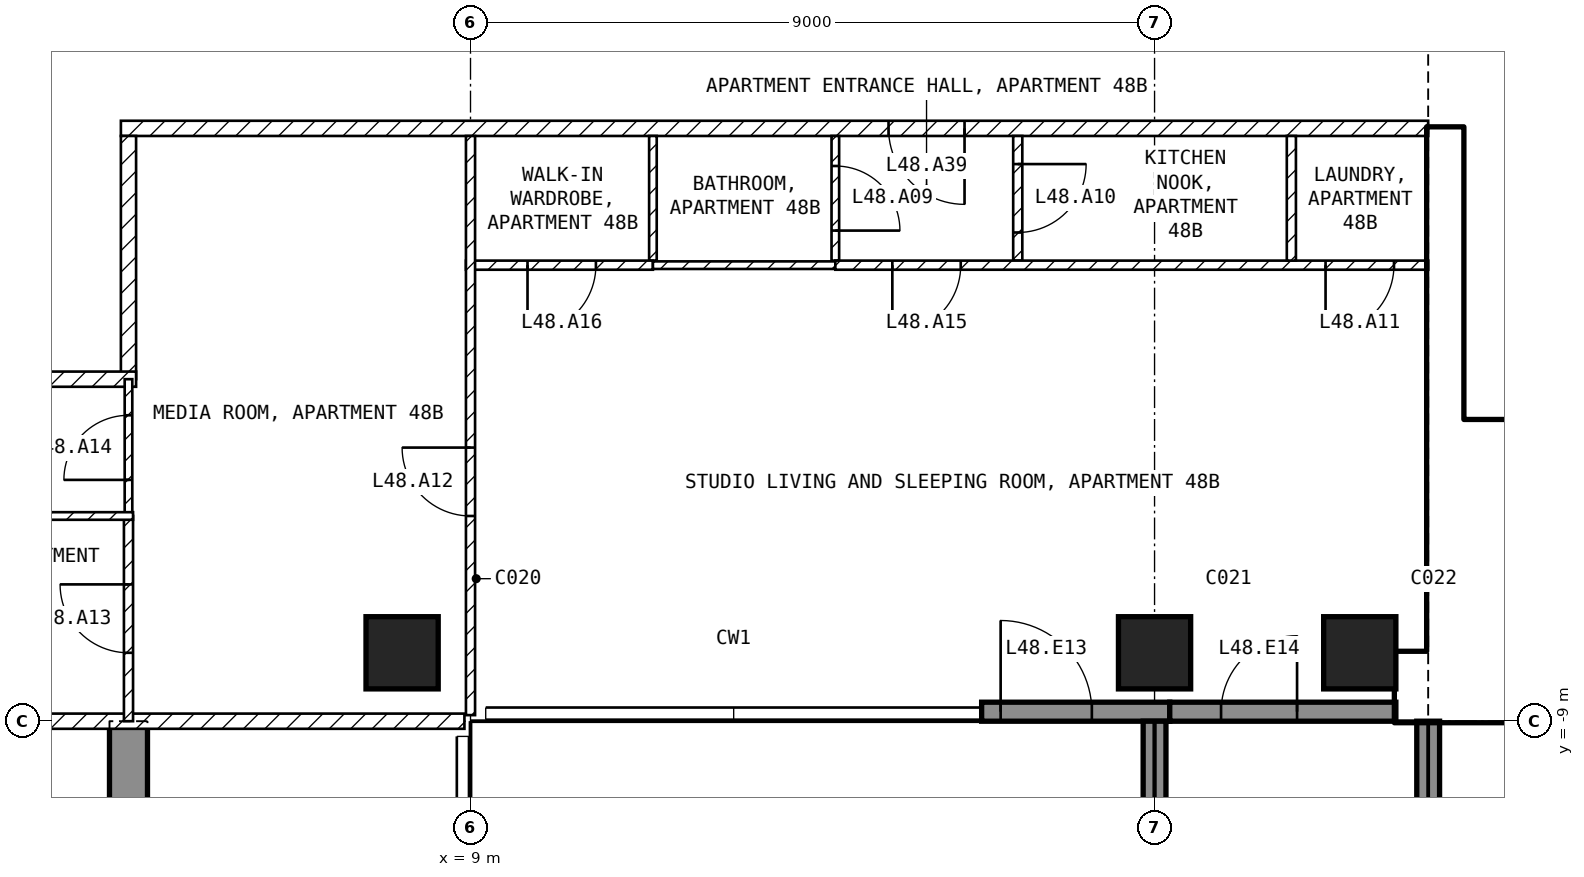
"""IFC4 building model, lengths in metres.
Left out: names, types, materials, properties, quantities, classifications, styles, units other than length and angle.
Written with IfcOpenShell. Run it as: python <this file> out.ifc"""

import sys

from ifc_helpers import new_model, si_unit, direction, frame, frame_2d, origin, origin_2d, place, context, subcontext, project, spatial, polyline, rectangle, outline, extrude, element, fill, save


model = new_model("IFC4")
c1 = context("Model", 3, precision=1e-05, world=origin(), true_north=direction((0.0, 1.0)))
c2 = subcontext(c1, "Body", "Model", "MODEL_VIEW")
j1 = project(units=[si_unit("LENGTHUNIT", "METRE"), si_unit("PLANEANGLEUNIT", "RADIAN")], contexts=[c1])
p1 = place(None, origin())
s1 = spatial("IfcSite", under=j1, at=p1, CompositionType="ELEMENT")
p2 = place(p1, origin())
s2 = spatial("IfcBuilding", under=s1, at=p2, CompositionType="ELEMENT")
p3 = place(p2, frame((0.0, 0.0, 194.6)))
s3 = spatial("IfcBuildingStorey", under=s2, at=p3, CompositionType="ELEMENT", Elevation=194.6)
for number, where, z_axis, x_axis in (
    (1, (8.1, -8.1, -0.25), (0.0, 0.0, 1.0), (1.0, 0.0, 0.0)),
    (2, (18.0, -8.1, -0.25), (0.0, 0.0, 1.0), (1.0, 0.0, 0.0)),
    (3, (20.7, -8.1, -0.25), (0.0, 0.0, 1.0), (1.0, 0.0, 0.0)),
):
    element("IfcColumn", number, at=place(p3, frame(where, z_axis=z_axis, x_axis=x_axis)), inside=s3, PredefinedType="COLUMN", context=c2, shape_type="SweptSolid", body=[
        extrude(rectangle(XDim=0.95, YDim=0.95, at=origin_2d()), origin(), (0.0, 0.0, 1.0), 3.5),
    ])
p4 = place(p3, frame((4.25, -20.225, -0.25), z_axis=(1.0, 0.0, 0.0), x_axis=(0.0, 1.0, 0.0)))
e4 = element("IfcWall", 4, at=p4, inside=s3, PredefinedType="SHEAR", context=c2, shape_type="SweptSolid", body=[
    extrude(outline(polyline([(0.0, 0.0), (6.725, 0.0), (6.725, 2.65), (9.125, 2.65), (9.125, 0.0), (11.225, 0.0), (11.225, 3.5), (0.0, 3.5), (0.0, 0.0)])), origin(), (0.0, 0.0, 1.0), 0.5),
])
p5 = place(p3, frame((15.725, -8.875, 0.0), z_axis=(0.0, 0.0, 1.0), x_axis=(1.0, 0.0, 0.0)))
e5 = element("IfcWall", 5, at=p5, inside=s3, PredefinedType="SOLIDWALL", context=c2, shape_type="SweptSolid", body=[
    extrude(rectangle(XDim=2.475, YDim=0.25, at=frame_2d((1.237, 0.0))), origin(), (0.0, 0.0, 1.0), 3.25),
])
p6 = place(p5, frame((0.25, 0.0, 0.0)))
e6 = element("IfcOpeningElement", 6, at=p6, cuts=e5, PredefinedType="OPENING", context=c2, shape_type="SweptSolid", body=[
    extrude(rectangle(XDim=1.2, YDim=2.4, at=frame_2d((0.6, 1.2))), frame((0.0, 0.135, 0.0), z_axis=(0.0, -1.0, 0.0), x_axis=(1.0, 0.0, 0.0)), (0.0, 0.0, 1.0), 0.27),
])
p7 = place(p3, frame((18.2, -8.875, 0.0), z_axis=(0.0, 0.0, 1.0), x_axis=(1.0, 0.0, 0.0)))
e7 = element("IfcWall", 7, at=p7, inside=s3, PredefinedType="SOLIDWALL", context=c2, shape_type="SweptSolid", body=[
    extrude(rectangle(XDim=2.975, YDim=0.25, at=frame_2d((1.488, 0.0))), origin(), (0.0, 0.0, 1.0), 3.25),
])
p8 = place(p7, frame((0.675, 0.0, 0.0)))
e8 = element("IfcOpeningElement", 8, at=p8, cuts=e7, PredefinedType="OPENING", context=c2, shape_type="SweptSolid", body=[
    extrude(rectangle(XDim=1.0, YDim=2.4, at=frame_2d((0.5, 1.2))), frame((0.0, 0.135, 0.0), z_axis=(0.0, -1.0, 0.0), x_axis=(1.0, 0.0, 0.0)), (0.0, 0.0, 1.0), 0.27),
])
for number, where, z_axis, x_axis in (
    (9, (18.0, -9.0, 0.0), (0.0, 0.0, 1.0), (0.0, -1.0, 0.0)),
    (10, (21.6, -9.0, 0.0), (0.0, 0.0, 1.0), (0.0, -1.0, 0.0)),
):
    element("IfcWall", number, at=place(p3, frame(where, z_axis=z_axis, x_axis=x_axis)), inside=s3, PredefinedType="SOLIDWALL", context=c2, shape_type="SweptSolid", body=[
        extrude(rectangle(XDim=2.7, YDim=0.3, at=frame_2d((1.35, 0.0))), origin(), (0.0, 0.0, 1.0), 3.25),
    ])
p9 = place(p3, frame((21.175, -8.55, 0.0), z_axis=(0.0, 0.0, 1.0), x_axis=(1.0, 0.0, 0.0)))
e11 = element("IfcWall", 11, at=p9, inside=s3, PredefinedType="SHEAR", context=c2, shape_type="SweptSolid", body=[
    extrude(rectangle(XDim=9.025, YDim=0.9, at=frame_2d((4.512, 0.0))), origin(), (0.0, 0.0, 1.0), 3.25),
])
p10 = place(p3, frame((21.825, -8.1, 0.0), z_axis=(0.0, 0.0, 1.0), x_axis=(0.0, 1.0, 0.0)))
e12 = element("IfcWall", 12, at=p10, inside=s3, PredefinedType="SHEAR", context=c2, shape_type="SweptSolid", body=[
    extrude(rectangle(XDim=6.9, YDim=0.45, at=frame_2d((3.45, 0.0))), origin(), (0.0, 0.0, 1.0), 3.25),
])
p11 = place(p3, frame((22.05, -5.15, 0.0), z_axis=(0.0, 0.0, 1.0), x_axis=(1.0, 0.0, 0.0)))
e13 = element("IfcWall", 13, at=p11, inside=s3, PredefinedType="SOLIDWALL", context=c2, shape_type="SweptSolid", body=[
    extrude(rectangle(XDim=6.3, YDim=0.2, at=frame_2d((3.15, 0.0))), origin(), (0.0, 0.0, 1.0), 3.25),
])
p12 = place(p11, frame((0.2, 0.0, 0.0)))
e14 = element("IfcOpeningElement", 14, at=p12, cuts=e13, PredefinedType="OPENING", context=c2, shape_type="SweptSolid", body=[
    extrude(rectangle(XDim=1.0, YDim=2.1, at=frame_2d((0.5, 1.05))), frame((0.0, 0.11, 0.0), z_axis=(0.0, -1.0, 0.0), x_axis=(1.0, 0.0, 0.0)), (0.0, 0.0, 1.0), 0.22),
])
p13 = place(p3, frame((21.6, -1.2, 0.0), z_axis=(0.0, 0.0, 1.0), x_axis=(-1.0, 0.0, 0.0)))
e15 = element("IfcWall", 15, at=p13, inside=s3, PredefinedType="PARTITIONING", context=c2, shape_type="SweptSolid", body=[
    extrude(rectangle(XDim=17.2, YDim=0.2, at=frame_2d((8.6, 0.0))), origin(), (0.0, 0.0, 1.0), 3.25),
])
p14 = place(p13, frame((6.1, 0.0, 0.0)))
e16 = element("IfcOpeningElement", 16, at=p14, cuts=e15, PredefinedType="OPENING", context=c2, shape_type="SweptSolid", body=[
    extrude(rectangle(XDim=1.0, YDim=2.1, at=frame_2d((0.5, 1.05))), frame((0.0, 0.11, 0.0), z_axis=(0.0, -1.0, 0.0), x_axis=(1.0, 0.0, 0.0)), (0.0, 0.0, 1.0), 0.22),
])
p15 = place(p3, frame((4.5, -1.3, 0.0), z_axis=(0.0, 0.0, 1.0), x_axis=(0.0, -1.0, 0.0)))
e17 = element("IfcWall", 17, at=p15, inside=s3, PredefinedType="PARTITIONING", context=c2, shape_type="SweptSolid", body=[
    extrude(rectangle(XDim=3.2, YDim=0.2, at=frame_2d((1.6, 0.0))), origin(), (0.0, 0.0, 1.0), 3.25),
])
p16 = place(p3, frame((4.6, -4.5, 0.0), z_axis=(0.0, 0.0, 1.0), x_axis=(-1.0, 0.0, 0.0)))
e18 = element("IfcWall", 18, at=p16, inside=s3, PredefinedType="PARTITIONING", context=c2, shape_type="SweptSolid", body=[
    extrude(rectangle(XDim=3.5, YDim=0.2, at=frame_2d((1.75, 0.0))), origin(), (0.0, 0.0, 1.0), 3.25),
])
p17 = place(p3, frame((8.92, -9.0, 0.0), z_axis=(0.0, 0.0, 1.0), x_axis=(-1.0, 0.0, 0.0)))
e19 = element("IfcWall", 19, at=p17, inside=s3, PredefinedType="PARTITIONING", context=c2, shape_type="SweptSolid", body=[
    extrude(rectangle(XDim=17.84, YDim=0.2, at=frame_2d((8.92, 0.0))), origin(), (0.0, 0.0, 1.0), 3.25),
])
p18 = place(p17, frame((8.42, 0.0, 0.0)))
e20 = element("IfcOpeningElement", 20, at=p18, cuts=e19, PredefinedType="OPENING", context=c2, shape_type="SweptSolid", body=[
    extrude(rectangle(XDim=1.0, YDim=2.1, at=frame_2d((0.5, 1.05))), frame((0.0, 0.11, 0.0), z_axis=(0.0, -1.0, 0.0), x_axis=(1.0, 0.0, 0.0)), (0.0, 0.0, 1.0), 0.22),
])
p19 = place(p3, frame((11.4, -1.3, 0.0), z_axis=(0.0, 0.0, 1.0), x_axis=(0.0, -1.0, 0.0)))
e21 = element("IfcWall", 21, at=p19, inside=s3, PredefinedType="PARTITIONING", context=c2, shape_type="SweptSolid", body=[
    extrude(rectangle(XDim=1.64, YDim=0.1, at=frame_2d((0.82, 0.0))), origin(), (0.0, 0.0, 1.0), 3.25),
])
p20 = place(p3, frame((11.4, -3.0, 0.0), z_axis=(0.0, 0.0, 1.0), x_axis=(-1.0, 0.0, 0.0)))
e22 = element("IfcWall", 22, at=p20, inside=s3, PredefinedType="PARTITIONING", context=c2, shape_type="SweptSolid", body=[
    extrude(rectangle(XDim=2.46, YDim=0.12, at=frame_2d((1.23, 0.0))), origin(), (0.0, 0.0, 1.0), 3.25),
])
p21 = place(p20, frame((0.75, 0.0, 0.0)))
e23 = element("IfcOpeningElement", 23, at=p21, cuts=e22, PredefinedType="OPENING", context=c2, shape_type="SweptSolid", body=[
    extrude(rectangle(XDim=0.9, YDim=2.1, at=frame_2d((0.45, 1.05))), frame((0.0, 0.07, 0.0), z_axis=(0.0, -1.0, 0.0), x_axis=(1.0, 0.0, 0.0)), (0.0, 0.0, 1.0), 0.14),
])
p22 = place(p3, frame((9.0, -8.92, 0.0), z_axis=(0.0, 0.0, 1.0), x_axis=(0.0, 1.0, 0.0)))
e24 = element("IfcWall", 24, at=p22, inside=s3, PredefinedType="PARTITIONING", context=c2, shape_type="SweptSolid", body=[
    extrude(rectangle(XDim=7.62, YDim=0.12, at=frame_2d((3.81, 0.0))), origin(), (0.0, 0.0, 1.0), 3.25),
])
p23 = place(p22, frame((2.62, 0.0, 0.0)))
e25 = element("IfcOpeningElement", 25, at=p23, cuts=e24, PredefinedType="OPENING", context=c2, shape_type="SweptSolid", body=[
    extrude(rectangle(XDim=0.9, YDim=2.1, at=frame_2d((0.45, 1.05))), frame((0.0, 0.07, 0.0), z_axis=(0.0, -1.0, 0.0), x_axis=(1.0, 0.0, 0.0)), (0.0, 0.0, 1.0), 0.14),
])
p24 = place(p3, frame((13.8, -1.3, 0.0), z_axis=(0.0, 0.0, 1.0), x_axis=(0.0, -1.0, 0.0)))
e26 = element("IfcWall", 26, at=p24, inside=s3, PredefinedType="PARTITIONING", context=c2, shape_type="SweptSolid", body=[
    extrude(rectangle(XDim=1.64, YDim=0.1, at=frame_2d((0.82, 0.0))), origin(), (0.0, 0.0, 1.0), 3.25),
])
p25 = place(p24, frame((0.395, 0.0, 0.0)))
e27 = element("IfcOpeningElement", 27, at=p25, cuts=e26, PredefinedType="OPENING", context=c2, shape_type="SweptSolid", body=[
    extrude(rectangle(XDim=0.85, YDim=2.1, at=frame_2d((0.425, 1.05))), frame((0.0, 0.06, 0.0), z_axis=(0.0, -1.0, 0.0), x_axis=(1.0, 0.0, 0.0)), (0.0, 0.0, 1.0), 0.12),
])
p26 = place(p3, frame((13.8, -3.0, 0.0), z_axis=(0.0, 0.0, 1.0), x_axis=(-1.0, 0.0, 0.0)))
e28 = element("IfcWall", 28, at=p26, inside=s3, PredefinedType="PARTITIONING", context=c2, shape_type="SweptSolid", body=[
    extrude(rectangle(XDim=2.4, YDim=0.1, at=frame_2d((1.2, 0.0))), origin(), (0.0, 0.0, 1.0), 3.25),
])
p27 = place(p3, frame((16.2, -1.3, 0.0), z_axis=(0.0, 0.0, 1.0), x_axis=(0.0, -1.0, 0.0)))
e29 = element("IfcWall", 29, at=p27, inside=s3, PredefinedType="PARTITIONING", context=c2, shape_type="SweptSolid", body=[
    extrude(rectangle(XDim=1.64, YDim=0.12, at=frame_2d((0.82, 0.0))), origin(), (0.0, 0.0, 1.0), 3.25),
])
p28 = place(p27, frame((0.37, 0.0, 0.0)))
e30 = element("IfcOpeningElement", 30, at=p28, cuts=e29, PredefinedType="OPENING", context=c2, shape_type="SweptSolid", body=[
    extrude(rectangle(XDim=0.9, YDim=2.1, at=frame_2d((0.45, 1.05))), frame((0.0, 0.07, 0.0), z_axis=(0.0, -1.0, 0.0), x_axis=(1.0, 0.0, 0.0)), (0.0, 0.0, 1.0), 0.14),
])
p29 = place(p3, frame((21.6, -3.0, 0.0), z_axis=(0.0, 0.0, 1.0), x_axis=(-1.0, 0.0, 0.0)))
e31 = element("IfcWall", 31, at=p29, inside=s3, PredefinedType="PARTITIONING", context=c2, shape_type="SweptSolid", body=[
    extrude(rectangle(XDim=7.8, YDim=0.12, at=frame_2d((3.9, 0.0))), origin(), (0.0, 0.0, 1.0), 3.25),
])
p30 = place(p29, frame((0.45, 0.0, 0.0)))
e32 = element("IfcOpeningElement", 32, at=p30, cuts=e31, PredefinedType="OPENING", context=c2, shape_type="SweptSolid", body=[
    extrude(rectangle(XDim=0.9, YDim=2.1, at=frame_2d((0.45, 1.05))), frame((0.0, 0.07, 0.0), z_axis=(0.0, -1.0, 0.0), x_axis=(1.0, 0.0, 0.0)), (0.0, 0.0, 1.0), 0.14),
])
p31 = place(p29, frame((6.15, 0.0, 0.0)))
e33 = element("IfcOpeningElement", 33, at=p31, cuts=e31, PredefinedType="OPENING", context=c2, shape_type="SweptSolid", body=[
    extrude(rectangle(XDim=0.9, YDim=2.1, at=frame_2d((0.45, 1.05))), frame((0.0, 0.07, 0.0), z_axis=(0.0, -1.0, 0.0), x_axis=(1.0, 0.0, 0.0)), (0.0, 0.0, 1.0), 0.14),
])
p32 = place(p3, frame((19.8, -1.3, 0.0), z_axis=(0.0, 0.0, 1.0), x_axis=(0.0, -1.0, 0.0)))
e34 = element("IfcWall", 34, at=p32, inside=s3, PredefinedType="PARTITIONING", context=c2, shape_type="SweptSolid", body=[
    extrude(rectangle(XDim=1.64, YDim=0.12, at=frame_2d((0.82, 0.0))), origin(), (0.0, 0.0, 1.0), 3.25),
])
p33 = place(p3, frame((4.5, -6.3, 0.0), z_axis=(0.0, 0.0, 1.0), x_axis=(0.0, 1.0, 0.0)))
e35 = element("IfcWall", 35, at=p33, inside=s3, PredefinedType="PARTITIONING", context=c2, shape_type="SweptSolid", body=[
    extrude(rectangle(XDim=1.8, YDim=0.1, at=frame_2d((0.9, 0.0))), origin(), (0.0, 0.0, 1.0), 3.25),
])
p34 = place(p33, frame((0.475, 0.0, 0.0)))
e36 = element("IfcOpeningElement", 36, at=p34, cuts=e35, PredefinedType="OPENING", context=c2, shape_type="SweptSolid", body=[
    extrude(rectangle(XDim=0.85, YDim=2.1, at=frame_2d((0.425, 1.05))), frame((0.0, 0.06, 0.0), z_axis=(0.0, -1.0, 0.0), x_axis=(1.0, 0.0, 0.0)), (0.0, 0.0, 1.0), 0.12),
])
p35 = place(p3, frame((4.5, -9.0, 0.0), z_axis=(0.0, 0.0, 1.0), x_axis=(0.0, 1.0, 0.0)))
e37 = element("IfcWall", 37, at=p35, inside=s3, PredefinedType="PARTITIONING", context=c2, shape_type="SweptSolid", body=[
    extrude(rectangle(XDim=2.7, YDim=0.12, at=frame_2d((1.35, 0.0))), origin(), (0.0, 0.0, 1.0), 3.25),
])
p36 = place(p35, frame((0.9, 0.0, 0.0)))
e38 = element("IfcOpeningElement", 38, at=p36, cuts=e37, PredefinedType="OPENING", context=c2, shape_type="SweptSolid", body=[
    extrude(rectangle(XDim=0.9, YDim=2.1, at=frame_2d((0.45, 1.05))), frame((0.0, 0.07, 0.0), z_axis=(0.0, -1.0, 0.0), x_axis=(1.0, 0.0, 0.0)), (0.0, 0.0, 1.0), 0.14),
])
p37 = place(p3, frame((4.56, -6.3, 0.0), z_axis=(0.0, 0.0, 1.0), x_axis=(-1.0, 0.0, 0.0)))
e39 = element("IfcWall", 39, at=p37, inside=s3, PredefinedType="PARTITIONING", context=c2, shape_type="SweptSolid", body=[
    extrude(rectangle(XDim=3.46, YDim=0.1, at=frame_2d((1.73, 0.0))), origin(), (0.0, 0.0, 1.0), 3.25),
])
p38 = place(p6, origin())
e40 = element("IfcDoor", 40, at=p38, inside=s3, OperationType="SINGLE_SWING_LEFT", PredefinedType="DOOR", context=c2, shape_type="SweptSolid", body=[
    extrude(rectangle(XDim=1.2, YDim=2.4, at=frame_2d((0.6, 1.2))), frame((0.0, 0.025, 0.0), z_axis=(0.0, -1.0, 0.0), x_axis=(1.0, 0.0, 0.0)), (0.0, 0.0, 1.0), 0.05),
])
fill(e6, e40)
p39 = place(p8, origin())
e41 = element("IfcDoor", 41, at=p39, inside=s3, OperationType="SINGLE_SWING_RIGHT", PredefinedType="DOOR", context=c2, shape_type="SweptSolid", body=[
    extrude(rectangle(XDim=1.0, YDim=2.4, at=frame_2d((0.5, 1.2))), frame((0.0, 0.025, 0.0), z_axis=(0.0, -1.0, 0.0), x_axis=(1.0, 0.0, 0.0)), (0.0, 0.0, 1.0), 0.05),
])
fill(e8, e41)
p40 = place(p12, origin())
e42 = element("IfcDoor", 42, at=p40, inside=s3, OperationType="SINGLE_SWING_LEFT", PredefinedType="DOOR", context=c2, shape_type="SweptSolid", body=[
    extrude(rectangle(XDim=1.0, YDim=2.1, at=frame_2d((0.5, 1.05))), frame((0.0, 0.025, 0.0), z_axis=(0.0, -1.0, 0.0), x_axis=(1.0, 0.0, 0.0)), (0.0, 0.0, 1.0), 0.05),
])
fill(e14, e42)
p41 = place(p25, origin())
e43 = element("IfcDoor", 43, at=p41, inside=s3, OperationType="SINGLE_SWING_RIGHT", PredefinedType="DOOR", context=c2, shape_type="SweptSolid", body=[
    extrude(rectangle(XDim=0.85, YDim=2.1, at=frame_2d((0.425, 1.05))), frame((0.0, 0.025, 0.0), z_axis=(0.0, -1.0, 0.0), x_axis=(1.0, 0.0, 0.0)), (0.0, 0.0, 1.0), 0.05),
])
fill(e27, e43)
p42 = place(p28, origin())
e44 = element("IfcDoor", 44, at=p42, inside=s3, OperationType="SINGLE_SWING_LEFT", PredefinedType="DOOR", context=c2, shape_type="SweptSolid", body=[
    extrude(rectangle(XDim=0.9, YDim=2.1, at=frame_2d((0.45, 1.05))), frame((0.0, 0.025, 0.0), z_axis=(0.0, -1.0, 0.0), x_axis=(1.0, 0.0, 0.0)), (0.0, 0.0, 1.0), 0.05),
])
fill(e30, e44)
p43 = place(p30, origin())
e45 = element("IfcDoor", 45, at=p43, inside=s3, OperationType="SINGLE_SWING_RIGHT", PredefinedType="DOOR", context=c2, shape_type="SweptSolid", body=[
    extrude(rectangle(XDim=0.9, YDim=2.1, at=frame_2d((0.45, 1.05))), frame((0.0, 0.025, 0.0), z_axis=(0.0, -1.0, 0.0), x_axis=(1.0, 0.0, 0.0)), (0.0, 0.0, 1.0), 0.05),
])
fill(e32, e45)
p44 = place(p23, origin())
e46 = element("IfcDoor", 46, at=p44, inside=s3, OperationType="SINGLE_SWING_RIGHT", PredefinedType="DOOR", context=c2, shape_type="SweptSolid", body=[
    extrude(rectangle(XDim=0.9, YDim=2.1, at=frame_2d((0.45, 1.05))), frame((0.0, 0.025, 0.0), z_axis=(0.0, -1.0, 0.0), x_axis=(1.0, 0.0, 0.0)), (0.0, 0.0, 1.0), 0.05),
])
fill(e25, e46)
p45 = place(p36, origin())
e47 = element("IfcDoor", 47, at=p45, inside=s3, OperationType="SINGLE_SWING_RIGHT", PredefinedType="DOOR", context=c2, shape_type="SweptSolid", body=[
    extrude(rectangle(XDim=0.9, YDim=2.1, at=frame_2d((0.45, 1.05))), frame((0.0, 0.025, 0.0), z_axis=(0.0, -1.0, 0.0), x_axis=(1.0, 0.0, 0.0)), (0.0, 0.0, 1.0), 0.05),
])
fill(e38, e47)
p46 = place(p34, origin())
e48 = element("IfcDoor", 48, at=p46, inside=s3, OperationType="SINGLE_SWING_LEFT", PredefinedType="DOOR", context=c2, shape_type="SweptSolid", body=[
    extrude(rectangle(XDim=0.85, YDim=2.1, at=frame_2d((0.425, 1.05))), frame((0.0, 0.025, 0.0), z_axis=(0.0, -1.0, 0.0), x_axis=(1.0, 0.0, 0.0)), (0.0, 0.0, 1.0), 0.05),
])
fill(e36, e48)
p47 = place(p31, origin())
e49 = element("IfcDoor", 49, at=p47, inside=s3, OperationType="SINGLE_SWING_RIGHT", PredefinedType="DOOR", context=c2, shape_type="SweptSolid", body=[
    extrude(rectangle(XDim=0.9, YDim=2.1, at=frame_2d((0.45, 1.05))), frame((0.0, 0.025, 0.0), z_axis=(0.0, -1.0, 0.0), x_axis=(1.0, 0.0, 0.0)), (0.0, 0.0, 1.0), 0.05),
])
fill(e33, e49)
p48 = place(p21, origin())
e50 = element("IfcDoor", 50, at=p48, inside=s3, OperationType="SINGLE_SWING_RIGHT", PredefinedType="DOOR", context=c2, shape_type="SweptSolid", body=[
    extrude(rectangle(XDim=0.9, YDim=2.1, at=frame_2d((0.45, 1.05))), frame((0.0, 0.025, 0.0), z_axis=(0.0, -1.0, 0.0), x_axis=(1.0, 0.0, 0.0)), (0.0, 0.0, 1.0), 0.05),
])
fill(e23, e50)
p49 = place(p14, origin())
e51 = element("IfcDoor", 51, at=p49, inside=s3, OperationType="SINGLE_SWING_LEFT", PredefinedType="DOOR", context=c2, shape_type="SweptSolid", body=[
    extrude(rectangle(XDim=1.0, YDim=2.1, at=frame_2d((0.5, 1.05))), frame((0.0, 0.025, 0.0), z_axis=(0.0, -1.0, 0.0), x_axis=(1.0, 0.0, 0.0)), (0.0, 0.0, 1.0), 0.05),
])
fill(e16, e51)
save(model, sys.argv[1])
